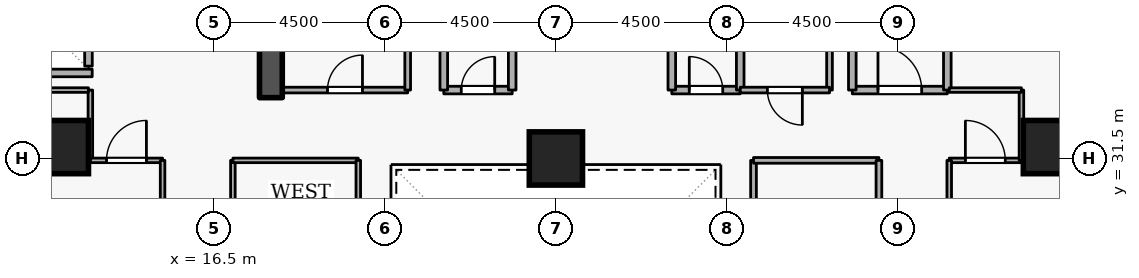
"""IFC4 building model, lengths in metres.
Left out: names, types, materials, properties, quantities, classifications, styles, units other than length and angle.
Written with IfcOpenShell. Run it as: python <this file> out.ifc"""

import sys

from ifc_helpers import new_model, si_unit, direction, frame, frame_2d, origin, origin_2d, place, context, subcontext, project, spatial, rectangle, extrude, element, fill, save


model = new_model("IFC4")
c1 = context("Model", 3, precision=1e-05, world=origin(), true_north=direction((0.0, 1.0)))
c2 = subcontext(c1, "Body", "Model", "MODEL_VIEW")
j1 = project(units=[si_unit("LENGTHUNIT", "METRE"), si_unit("PLANEANGLEUNIT", "RADIAN")], contexts=[c1])
p1 = place(None, origin())
s1 = spatial("IfcSite", under=j1, at=p1, CompositionType="ELEMENT")
p2 = place(p1, origin())
s2 = spatial("IfcBuilding", under=s1, at=p2, CompositionType="ELEMENT")
p3 = place(p2, frame((0.0, 0.0, 42.3)))
s3 = spatial("IfcBuildingStorey", under=s2, at=p3, CompositionType="ELEMENT", Elevation=42.3)
p4 = place(p3, frame((18.0, 33.1, 0.0), z_axis=(0.0, 0.0, 1.0), x_axis=(0.0, 1.0, 0.0)))
e1 = element("IfcWall", 1, at=p4, inside=s3, PredefinedType="SHEAR", context=c2, shape_type="SweptSolid", body=[
    extrude(rectangle(XDim=5.7, YDim=0.6, at=frame_2d((2.85, 0.0))), origin(), (0.0, 0.0, 1.0), 3.6),
])
for number, where, z_axis, x_axis in (
    (2, (12.5, 31.8, 0.0), (0.0, 0.0, 1.0), (1.0, 0.0, 0.0)),
    (3, (38.5, 31.8, 0.0), (0.0, 0.0, 1.0), (1.0, 0.0, 0.0)),
    (4, (25.5, 31.5, 0.0), (0.0, 0.0, 1.0), (1.0, 0.0, 0.0)),
):
    element("IfcColumn", number, at=place(p3, frame(where, z_axis=z_axis, x_axis=x_axis)), inside=s3, PredefinedType="COLUMN", context=c2, shape_type="SweptSolid", body=[
        extrude(rectangle(XDim=1.4, YDim=1.4, at=origin_2d()), origin(), (0.0, 0.0, 1.0), 3.6),
    ])
p5 = place(p3, frame((13.2, 33.93, 0.0), z_axis=(0.0, 0.0, 1.0), x_axis=(0.0, 1.0, 0.0)))
e5 = element("IfcWall", 5, at=p5, inside=s3, PredefinedType="STANDARD", context=c2, shape_type="SweptSolid", body=[
    extrude(rectangle(XDim=1.94, YDim=0.2, at=frame_2d((0.97, 0.0))), origin(), (0.0, 0.0, 1.0), 3.34),
])
p6 = place(p3, frame((11.002, 33.75, 0.0), z_axis=(0.0, 0.0, 1.0), x_axis=(1.0, 0.0, 0.0)))
e6 = element("IfcWall", 6, at=p6, inside=s3, PredefinedType="STANDARD", context=c2, shape_type="SweptSolid", body=[
    extrude(rectangle(XDim=2.296, YDim=0.2, at=frame_2d((1.148, 0.0))), origin(), (0.0, 0.0, 1.0), 3.34),
])
p7 = place(p3, frame((33.3, 33.3, 0.0), z_axis=(0.0, 0.0, 1.0), x_axis=(1.0, 0.0, 0.0)))
e7 = element("IfcWall", 7, at=p7, inside=s3, PredefinedType="STANDARD", context=c2, shape_type="SweptSolid", body=[
    extrude(rectangle(XDim=2.5, YDim=0.2, at=frame_2d((1.25, 0.0))), origin(), (0.0, 0.0, 1.0), 3.34),
])
p8 = place(p7, frame((0.675, 0.0, 0.0)))
e8 = element("IfcOpeningElement", 8, at=p8, cuts=e7, PredefinedType="OPENING", context=c2, shape_type="SweptSolid", body=[
    extrude(rectangle(XDim=1.15, YDim=2.1, at=frame_2d((0.575, 1.05))), frame((0.0, 0.11, 0.0), z_axis=(0.0, -1.0, 0.0), x_axis=(1.0, 0.0, 0.0)), (0.0, 0.0, 1.0), 0.22),
])
p9 = place(p3, frame((35.8, 33.3, 0.0), z_axis=(0.0, 0.0, 1.0), x_axis=(0.0, 1.0, 0.0)))
e9 = element("IfcWall", 9, at=p9, inside=s3, PredefinedType="STANDARD", context=c2, shape_type="SweptSolid", body=[
    extrude(rectangle(XDim=5.7, YDim=0.2, at=frame_2d((2.85, 0.0))), origin(), (0.0, 0.0, 1.0), 3.34),
])
p10 = place(p3, frame((33.3, 35.6, 0.0), z_axis=(0.0, 0.0, 1.0), x_axis=(0.0, -1.0, 0.0)))
e10 = element("IfcWall", 10, at=p10, inside=s3, PredefinedType="STANDARD", context=c2, shape_type="SweptSolid", body=[
    extrude(rectangle(XDim=2.3, YDim=0.2, at=frame_2d((1.15, 0.0))), origin(), (0.0, 0.0, 1.0), 2.545),
])
p11 = place(p3, frame((22.55, 33.3, 0.0), z_axis=(0.0, 0.0, 1.0), x_axis=(1.0, 0.0, 0.0)))
e11 = element("IfcWall", 11, at=p11, inside=s3, PredefinedType="STANDARD", context=c2, shape_type="SweptSolid", body=[
    extrude(rectangle(XDim=1.8, YDim=0.2, at=frame_2d((0.9, 0.0))), origin(), (0.0, 0.0, 1.0), 3.34),
])
p12 = place(p11, frame((0.46, 0.0, 0.0)))
e12 = element("IfcOpeningElement", 12, at=p12, cuts=e11, PredefinedType="OPENING", context=c2, shape_type="SweptSolid", body=[
    extrude(rectangle(XDim=0.88, YDim=2.04, at=frame_2d((0.44, 1.02))), frame((0.0, 0.11, 0.0), z_axis=(0.0, -1.0, 0.0), x_axis=(1.0, 0.0, 0.0)), (0.0, 0.0, 1.0), 0.22),
])
for number, where, z_axis, x_axis in (
    (13, (24.35, 33.3, 0.0), (0.0, 0.0, 1.0), (0.0, 1.0, 0.0)),
    (14, (22.55, 35.35, 0.0), (0.0, 0.0, 1.0), (0.0, -1.0, 0.0)),
):
    element("IfcWall", number, at=place(p3, frame(where, z_axis=z_axis, x_axis=x_axis)), inside=s3, PredefinedType="STANDARD", context=c2, shape_type="SweptSolid", body=[
        extrude(rectangle(XDim=2.05, YDim=0.2, at=frame_2d((1.025, 0.0))), origin(), (0.0, 0.0, 1.0), 3.34),
    ])
p13 = place(p3, frame((28.55, 33.3, 0.0), z_axis=(0.0, 0.0, 1.0), x_axis=(1.0, 0.0, 0.0)))
e15 = element("IfcWall", 15, at=p13, inside=s3, PredefinedType="STANDARD", context=c2, shape_type="SweptSolid", body=[
    extrude(rectangle(XDim=1.8, YDim=0.2, at=frame_2d((0.9, 0.0))), origin(), (0.0, 0.0, 1.0), 3.34),
])
p14 = place(p13, frame((0.46, 0.0, 0.0)))
e16 = element("IfcOpeningElement", 16, at=p14, cuts=e15, PredefinedType="OPENING", context=c2, shape_type="SweptSolid", body=[
    extrude(rectangle(XDim=0.88, YDim=2.04, at=frame_2d((0.44, 1.02))), frame((0.0, 0.11, 0.0), z_axis=(0.0, -1.0, 0.0), x_axis=(1.0, 0.0, 0.0)), (0.0, 0.0, 1.0), 0.22),
])
for number, where, z_axis, x_axis in (
    (17, (30.35, 33.3, 0.0), (0.0, 0.0, 1.0), (0.0, 1.0, 0.0)),
    (18, (28.55, 35.35, 0.0), (0.0, 0.0, 1.0), (0.0, -1.0, 0.0)),
):
    element("IfcWall", number, at=place(p3, frame(where, z_axis=z_axis, x_axis=x_axis)), inside=s3, PredefinedType="STANDARD", context=c2, shape_type="SweptSolid", body=[
        extrude(rectangle(XDim=2.05, YDim=0.2, at=frame_2d((1.025, 0.0))), origin(), (0.0, 0.0, 1.0), 3.34),
    ])
p15 = place(p3, frame((18.3, 33.3, 0.0), z_axis=(0.0, 0.0, 1.0), x_axis=(1.0, 0.0, 0.0)))
e19 = element("IfcWall", 19, at=p15, inside=s3, PredefinedType="PARTITIONING", context=c2, shape_type="SweptSolid", body=[
    extrude(rectangle(XDim=3.3, YDim=0.15, at=frame_2d((1.65, 0.0))), origin(), (0.0, 0.0, 1.0), 3.34),
])
p16 = place(p15, frame((1.19, 0.0, 0.0)))
e20 = element("IfcOpeningElement", 20, at=p16, cuts=e19, PredefinedType="OPENING", context=c2, shape_type="SweptSolid", body=[
    extrude(rectangle(XDim=0.92, YDim=2.08, at=frame_2d((0.46, 1.04))), frame((0.0, 0.085, 0.0), z_axis=(0.0, -1.0, 0.0), x_axis=(1.0, 0.0, 0.0)), (0.0, 0.0, 1.0), 0.17),
])
p17 = place(p3, frame((21.6, 33.3, 0.0), z_axis=(0.0, 0.0, 1.0), x_axis=(0.0, 1.0, 0.0)))
e21 = element("IfcWall", 21, at=p17, inside=s3, PredefinedType="PARTITIONING", context=c2, shape_type="SweptSolid", body=[
    extrude(rectangle(XDim=2.05, YDim=0.15, at=frame_2d((1.025, 0.0))), origin(), (0.0, 0.0, 1.0), 3.34),
])
p18 = place(p3, frame((32.7, 35.35, 0.0), z_axis=(0.0, 0.0, 1.0), x_axis=(0.0, -1.0, 0.0)))
e22 = element("IfcWall", 22, at=p18, inside=s3, PredefinedType="PARTITIONING", context=c2, shape_type="SweptSolid", body=[
    extrude(rectangle(XDim=2.05, YDim=0.15, at=frame_2d((1.025, 0.0))), origin(), (0.0, 0.0, 1.0), 2.545),
])
p19 = place(p3, frame((32.7, 33.3, 0.0), z_axis=(0.0, 0.0, 1.0), x_axis=(-1.0, 0.0, 0.0)))
e23 = element("IfcWall", 23, at=p19, inside=s3, PredefinedType="PARTITIONING", context=c2, shape_type="SweptSolid", body=[
    extrude(rectangle(XDim=2.35, YDim=0.15, at=frame_2d((1.175, 0.0))), origin(), (0.0, 0.0, 1.0), 3.34),
])
p20 = place(p19, frame((0.715, 0.0, 0.0)))
e24 = element("IfcOpeningElement", 24, at=p20, cuts=e23, PredefinedType="OPENING", context=c2, shape_type="SweptSolid", body=[
    extrude(rectangle(XDim=0.92, YDim=2.08, at=frame_2d((0.46, 1.04))), frame((0.0, 0.085, 0.0), z_axis=(0.0, -1.0, 0.0), x_axis=(1.0, 0.0, 0.0)), (0.0, 0.0, 1.0), 0.17),
])
p21 = place(p3, frame((13.25, 33.3, 0.0), z_axis=(0.0, 0.0, 1.0), x_axis=(0.0, -1.0, 0.0)))
e25 = element("IfcWall", 25, at=p21, inside=s3, PredefinedType="PARTITIONING", context=c2, shape_type="SweptSolid", body=[
    extrude(rectangle(XDim=1.85, YDim=0.12, at=frame_2d((0.925, 0.0))), origin(), (0.0, 0.0, 1.0), 3.34),
])
p22 = place(p3, frame((13.25, 31.45, 0.0), z_axis=(0.0, 0.0, 1.0), x_axis=(1.0, 0.0, 0.0)))
e26 = element("IfcWall", 26, at=p22, inside=s3, PredefinedType="PARTITIONING", context=c2, shape_type="SweptSolid", body=[
    extrude(rectangle(XDim=1.9, YDim=0.12, at=frame_2d((0.95, 0.0))), origin(), (0.0, 0.0, 1.0), 3.34),
])
p23 = place(p22, frame((0.425, 0.0, 0.0)))
e27 = element("IfcOpeningElement", 27, at=p23, cuts=e26, PredefinedType="OPENING", context=c2, shape_type="SweptSolid", body=[
    extrude(rectangle(XDim=1.05, YDim=2.1, at=frame_2d((0.525, 1.05))), frame((0.0, 0.07, 0.0), z_axis=(0.0, -1.0, 0.0), x_axis=(1.0, 0.0, 0.0)), (0.0, 0.0, 1.0), 0.14),
])
p24 = place(p3, frame((15.15, 31.45, 0.0), z_axis=(0.0, 0.0, 1.0), x_axis=(0.0, -1.0, 0.0)))
e28 = element("IfcWall", 28, at=p24, inside=s3, PredefinedType="PARTITIONING", context=c2, shape_type="SweptSolid", body=[
    extrude(rectangle(XDim=1.3, YDim=0.12, at=frame_2d((0.65, 0.0))), origin(), (0.0, 0.0, 1.0), 3.34),
])
p25 = place(p3, frame((10.9, 33.3, 0.0), z_axis=(0.0, 0.0, 1.0), x_axis=(1.0, 0.0, 0.0)))
e29 = element("IfcWall", 29, at=p25, inside=s3, PredefinedType="PARTITIONING", context=c2, shape_type="SweptSolid", body=[
    extrude(rectangle(XDim=2.3, YDim=0.12, at=frame_2d((1.15, 0.0))), origin(), (0.0, 0.0, 1.0), 3.34),
])
p26 = place(p3, frame((35.85, 31.45, 0.0), z_axis=(0.0, 0.0, 1.0), x_axis=(1.0, 0.0, 0.0)))
e30 = element("IfcWall", 30, at=p26, inside=s3, PredefinedType="PARTITIONING", context=c2, shape_type="SweptSolid", body=[
    extrude(rectangle(XDim=1.9, YDim=0.12, at=frame_2d((0.95, 0.0))), origin(), (0.0, 0.0, 1.0), 3.34),
])
p27 = place(p26, frame((0.425, 0.0, 0.0)))
e31 = element("IfcOpeningElement", 31, at=p27, cuts=e30, PredefinedType="OPENING", context=c2, shape_type="SweptSolid", body=[
    extrude(rectangle(XDim=1.05, YDim=2.1, at=frame_2d((0.525, 1.05))), frame((0.0, 0.07, 0.0), z_axis=(0.0, -1.0, 0.0), x_axis=(1.0, 0.0, 0.0)), (0.0, 0.0, 1.0), 0.14),
])
p28 = place(p3, frame((37.75, 31.45, 0.0), z_axis=(0.0, 0.0, 1.0), x_axis=(0.0, 1.0, 0.0)))
e32 = element("IfcWall", 32, at=p28, inside=s3, PredefinedType="PARTITIONING", context=c2, shape_type="SweptSolid", body=[
    extrude(rectangle(XDim=1.85, YDim=0.12, at=frame_2d((0.925, 0.0))), origin(), (0.0, 0.0, 1.0), 3.34),
])
p29 = place(p3, frame((37.75, 33.3, 0.0), z_axis=(0.0, 0.0, 1.0), x_axis=(-1.0, 0.0, 0.0)))
e33 = element("IfcWall", 33, at=p29, inside=s3, PredefinedType="PARTITIONING", context=c2, shape_type="SweptSolid", body=[
    extrude(rectangle(XDim=1.9, YDim=0.12, at=frame_2d((0.95, 0.0))), origin(), (0.0, 0.0, 1.0), 3.34),
])
p30 = place(p3, frame((35.85, 30.15, 0.0), z_axis=(0.0, 0.0, 1.0), x_axis=(0.0, 1.0, 0.0)))
e34 = element("IfcWall", 34, at=p30, inside=s3, PredefinedType="PARTITIONING", context=c2, shape_type="SweptSolid", body=[
    extrude(rectangle(XDim=1.3, YDim=0.12, at=frame_2d((0.65, 0.0))), origin(), (0.0, 0.0, 1.0), 3.34),
])
p31 = place(p3, frame((30.7, 22.55, 0.0), z_axis=(0.0, 0.0, 1.0), x_axis=(0.0, 1.0, 0.0)))
e35 = element("IfcWall", 35, at=p31, inside=s3, PredefinedType="PARTITIONING", context=c2, shape_type="SweptSolid", body=[
    extrude(rectangle(XDim=8.9, YDim=0.15, at=frame_2d((4.45, 0.0))), origin(), (0.0, 0.0, 1.0), 3.34),
])
p32 = place(p3, frame((30.7, 31.45, 0.0), z_axis=(0.0, 0.0, 1.0), x_axis=(1.0, 0.0, 0.0)))
e36 = element("IfcWall", 36, at=p32, inside=s3, PredefinedType="PARTITIONING", context=c2, shape_type="SweptSolid", body=[
    extrude(rectangle(XDim=3.3, YDim=0.15, at=frame_2d((1.65, 0.0))), origin(), (0.0, 0.0, 1.0), 3.34),
])
p33 = place(p3, frame((34.0, 31.45, 0.0), z_axis=(0.0, 0.0, 1.0), x_axis=(0.0, -1.0, 0.0)))
e37 = element("IfcWall", 37, at=p33, inside=s3, PredefinedType="PARTITIONING", context=c2, shape_type="SweptSolid", body=[
    extrude(rectangle(XDim=8.9, YDim=0.15, at=frame_2d((4.45, 0.0))), origin(), (0.0, 0.0, 1.0), 3.34),
])
p34 = place(p33, frame((3.8, 0.0, 0.0)))
e38 = element("IfcOpeningElement", 38, at=p34, cuts=e37, PredefinedType="OPENING", context=c2, shape_type="SweptSolid", body=[
    extrude(rectangle(XDim=1.3, YDim=2.12, at=frame_2d((0.65, 1.06))), frame((0.0, 0.085, 0.0), z_axis=(0.0, -1.0, 0.0), x_axis=(1.0, 0.0, 0.0)), (0.0, 0.0, 1.0), 0.17),
])
p35 = place(p3, frame((17.0, 22.55, 0.0), z_axis=(0.0, 0.0, 1.0), x_axis=(0.0, 1.0, 0.0)))
e39 = element("IfcWall", 39, at=p35, inside=s3, PredefinedType="PARTITIONING", context=c2, shape_type="SweptSolid", body=[
    extrude(rectangle(XDim=8.9, YDim=0.12, at=frame_2d((4.45, 0.0))), origin(), (0.0, 0.0, 1.0), 3.34),
])
p36 = place(p35, frame((3.975, 0.0, 0.0)))
e40 = element("IfcOpeningElement", 40, at=p36, cuts=e39, PredefinedType="OPENING", context=c2, shape_type="SweptSolid", body=[
    extrude(rectangle(XDim=0.95, YDim=2.1, at=frame_2d((0.475, 1.05))), frame((0.0, 0.07, 0.0), z_axis=(0.0, -1.0, 0.0), x_axis=(1.0, 0.0, 0.0)), (0.0, 0.0, 1.0), 0.14),
])
p37 = place(p3, frame((17.0, 31.45, 0.0), z_axis=(0.0, 0.0, 1.0), x_axis=(1.0, 0.0, 0.0)))
e41 = element("IfcWall", 41, at=p37, inside=s3, PredefinedType="PARTITIONING", context=c2, shape_type="SweptSolid", body=[
    extrude(rectangle(XDim=3.3, YDim=0.12, at=frame_2d((1.65, 0.0))), origin(), (0.0, 0.0, 1.0), 3.34),
])
p38 = place(p3, frame((20.3, 31.45, 0.0), z_axis=(0.0, 0.0, 1.0), x_axis=(0.0, -1.0, 0.0)))
e42 = element("IfcWall", 42, at=p38, inside=s3, PredefinedType="PARTITIONING", context=c2, shape_type="SweptSolid", body=[
    extrude(rectangle(XDim=8.9, YDim=0.12, at=frame_2d((4.45, 0.0))), origin(), (0.0, 0.0, 1.0), 3.34),
])
p39 = place(p8, origin())
e43 = element("IfcDoor", 43, at=p39, inside=s3, OperationType="SINGLE_SWING_LEFT", PredefinedType="DOOR", context=c2, shape_type="SweptSolid", body=[
    extrude(rectangle(XDim=1.15, YDim=2.1, at=frame_2d((0.575, 1.05))), frame((0.0, 0.025, 0.0), z_axis=(0.0, -1.0, 0.0), x_axis=(1.0, 0.0, 0.0)), (0.0, 0.0, 1.0), 0.05),
])
fill(e8, e43)
p40 = place(p12, origin())
e44 = element("IfcDoor", 44, at=p40, inside=s3, OperationType="SINGLE_SWING_RIGHT", PredefinedType="DOOR", context=c2, shape_type="SweptSolid", body=[
    extrude(rectangle(XDim=0.88, YDim=2.04, at=frame_2d((0.44, 1.02))), frame((0.0, 0.025, 0.0), z_axis=(0.0, -1.0, 0.0), x_axis=(1.0, 0.0, 0.0)), (0.0, 0.0, 1.0), 0.05),
])
fill(e12, e44)
p41 = place(p14, origin())
e45 = element("IfcDoor", 45, at=p41, inside=s3, OperationType="SINGLE_SWING_LEFT", PredefinedType="DOOR", context=c2, shape_type="SweptSolid", body=[
    extrude(rectangle(XDim=0.88, YDim=2.04, at=frame_2d((0.44, 1.02))), frame((0.0, 0.025, 0.0), z_axis=(0.0, -1.0, 0.0), x_axis=(1.0, 0.0, 0.0)), (0.0, 0.0, 1.0), 0.05),
])
fill(e16, e45)
p42 = place(p16, origin())
e46 = element("IfcDoor", 46, at=p42, inside=s3, OperationType="SINGLE_SWING_RIGHT", PredefinedType="DOOR", context=c2, shape_type="SweptSolid", body=[
    extrude(rectangle(XDim=0.92, YDim=2.08, at=frame_2d((0.46, 1.04))), frame((0.0, 0.025, 0.0), z_axis=(0.0, -1.0, 0.0), x_axis=(1.0, 0.0, 0.0)), (0.0, 0.0, 1.0), 0.05),
])
fill(e20, e46)
p43 = place(p20, origin())
e47 = element("IfcDoor", 47, at=p43, inside=s3, OperationType="SINGLE_SWING_LEFT", PredefinedType="DOOR", context=c2, shape_type="SweptSolid", body=[
    extrude(rectangle(XDim=0.92, YDim=2.08, at=frame_2d((0.46, 1.04))), frame((0.0, 0.025, 0.0), z_axis=(0.0, -1.0, 0.0), x_axis=(1.0, 0.0, 0.0)), (0.0, 0.0, 1.0), 0.05),
])
fill(e24, e47)
p44 = place(p23, origin())
e48 = element("IfcDoor", 48, at=p44, inside=s3, OperationType="SINGLE_SWING_RIGHT", PredefinedType="DOOR", context=c2, shape_type="SweptSolid", body=[
    extrude(rectangle(XDim=1.05, YDim=2.1, at=frame_2d((0.525, 1.05))), frame((0.0, 0.025, 0.0), z_axis=(0.0, -1.0, 0.0), x_axis=(1.0, 0.0, 0.0)), (0.0, 0.0, 1.0), 0.05),
])
fill(e27, e48)
p45 = place(p27, origin())
e49 = element("IfcDoor", 49, at=p45, inside=s3, OperationType="SINGLE_SWING_LEFT", PredefinedType="DOOR", context=c2, shape_type="SweptSolid", body=[
    extrude(rectangle(XDim=1.05, YDim=2.1, at=frame_2d((0.525, 1.05))), frame((0.0, 0.025, 0.0), z_axis=(0.0, -1.0, 0.0), x_axis=(1.0, 0.0, 0.0)), (0.0, 0.0, 1.0), 0.05),
])
fill(e31, e49)
save(model, sys.argv[1])
